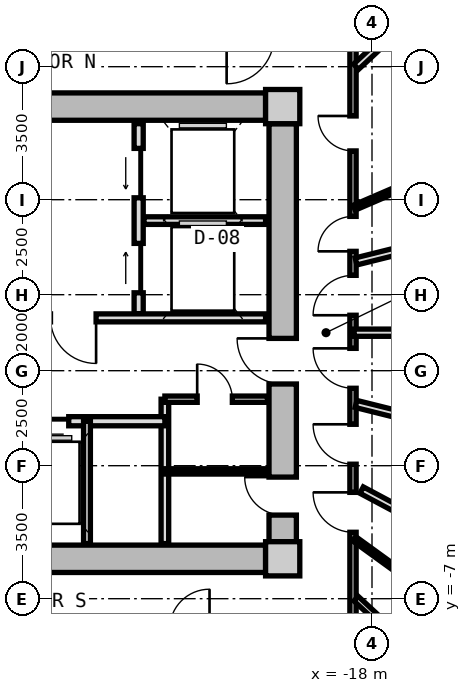
"""IFC4 building model, lengths in metres.
Left out: names, types, materials, properties, quantities, classifications, styles, units other than length and angle.
Written with IfcOpenShell. Run it as: python <this file> out.ifc"""

import sys

from ifc_helpers import new_model, si_unit, direction, frame, frame_2d, origin, origin_2d, place, context, subcontext, project, spatial, rectangle, extrude, source, transform, mapped, element, fill, save


model = new_model("IFC4")
c1 = context("Model", 3, precision=1e-05, world=origin(), true_north=direction((0.0, 1.0)))
c2 = subcontext(c1, "Body", "Model", "MODEL_VIEW")
j1 = project(units=[si_unit("LENGTHUNIT", "METRE"), si_unit("PLANEANGLEUNIT", "RADIAN")], contexts=[c1])
p1 = place(None, origin())
s1 = spatial("IfcSite", under=j1, at=p1, CompositionType="ELEMENT")
p2 = place(p1, origin())
s2 = spatial("IfcBuilding", under=s1, at=p2, CompositionType="ELEMENT")
p3 = place(p2, frame((0.0, 0.0, 114.55)))
s3 = spatial("IfcBuildingStorey", under=s2, at=p3, CompositionType="ELEMENT", Elevation=114.55)
m1 = source(origin(), c2, "Body", "SweptSolid", [
    extrude(rectangle(XDim=0.9, YDim=0.9, at=origin_2d()), origin(), (0.0, 0.0, 1.0), 3.05),
])
for number, where, z_axis, x_axis in (
    (1, (-20.35, -5.95, 0.0), (0.0, 0.0, 1.0), (1.0, 0.0, 0.0)),
    (2, (-20.35, 5.95, 0.0), (0.0, 0.0, 1.0), (1.0, 0.0, 0.0)),
):
    element("IfcColumn", number, at=place(p3, frame(where, z_axis=z_axis, x_axis=x_axis)), inside=s3, PredefinedType="COLUMN", context=c2, shape_type="MappedRepresentation", body=[
        mapped(m1, transform((0.0, 0.0, 0.0), x_axis=(1.0, 0.0, 0.0), y_axis=(0.0, 1.0, 0.0), z_axis=(0.0, 0.0, 1.0), scale=1.0)),
    ])
m2 = source(origin(), c2, "Body", "SweptSolid", [
    extrude(rectangle(XDim=14.4, YDim=0.72, at=frame_2d((7.2, 0.0))), origin(), (0.0, 0.0, 1.0), 2.79),
])
for number, where, z_axis, x_axis in (
    (3, (-35.2, 5.95, 0.0), (0.0, 0.0, 1.0), (1.0, 0.0, 0.0)),
    (4, (-20.8, -5.95, 0.0), (0.0, 0.0, 1.0), (-1.0, 0.0, 0.0)),
):
    element("IfcWall", number, at=place(p3, frame(where, z_axis=z_axis, x_axis=x_axis)), inside=s3, PredefinedType="SHEAR", context=c2, shape_type="MappedRepresentation", body=[
        mapped(m2, transform((0.0, 0.0, 0.0), x_axis=(1.0, 0.0, 0.0), y_axis=(0.0, 1.0, 0.0), z_axis=(0.0, 0.0, 1.0), scale=1.0)),
    ])
m3 = source(origin(), c2, "Body", "SweptSolid", [
    extrude(rectangle(XDim=11.0, YDim=0.72, at=frame_2d((5.5, 0.0))), origin(), (0.0, 0.0, 1.0), 2.79),
])
p4 = place(p3, frame((-20.35, 5.5, 0.0), z_axis=(0.0, 0.0, 1.0), x_axis=(0.0, -1.0, 0.0)))
e5 = element("IfcWall", 5, at=p4, inside=s3, PredefinedType="SHEAR", context=c2, shape_type="MappedRepresentation", body=[
    mapped(m3, transform((0.0, 0.0, 0.0), x_axis=(1.0, 0.0, 0.0), y_axis=(0.0, 1.0, 0.0), z_axis=(0.0, 0.0, 1.0), scale=1.0)),
])
p5 = place(p4, frame((5.65, 0.0, 0.0)))
e6 = element("IfcOpeningElement", 6, at=p5, cuts=e5, PredefinedType="OPENING", context=c2, shape_type="SweptSolid", body=[
    extrude(rectangle(XDim=1.2, YDim=2.15, at=frame_2d((0.6, 1.075))), frame((0.0, 0.37, 0.0), z_axis=(0.0, -1.0, 0.0), x_axis=(1.0, 0.0, 0.0)), (0.0, 0.0, 1.0), 0.74),
])
p6 = place(p4, frame((9.3, 0.0, 0.0)))
e7 = element("IfcOpeningElement", 7, at=p6, cuts=e5, PredefinedType="OPENING", context=c2, shape_type="SweptSolid", body=[
    extrude(rectangle(XDim=1.0, YDim=2.1, at=frame_2d((0.5, 1.05))), frame((0.0, 0.37, 0.0), z_axis=(0.0, -1.0, 0.0), x_axis=(1.0, 0.0, 0.0)), (0.0, 0.0, 1.0), 0.74),
])
m4 = source(origin(), c2, "Body", "SweptSolid", [
    extrude(rectangle(XDim=5.0, YDim=0.24, at=frame_2d((2.5, 0.0))), origin(), (0.0, 0.0, 1.0), 2.775),
])
p7 = place(p3, frame((-24.14, 0.5, 0.0), z_axis=(0.0, 0.0, 1.0), x_axis=(0.0, 1.0, 0.0)))
e8 = element("IfcWall", 8, at=p7, inside=s3, PredefinedType="PARTITIONING", context=c2, shape_type="MappedRepresentation", body=[
    mapped(m4, transform((0.0, 0.0, 0.0), x_axis=(1.0, 0.0, 0.0), y_axis=(0.0, 1.0, 0.0), z_axis=(0.0, 0.0, 1.0), scale=1.0)),
])
p8 = place(p7, frame((3.05, 0.0, 0.0)))
e9 = element("IfcOpeningElement", 9, at=p8, cuts=e8, PredefinedType="OPENING", context=c2, shape_type="SweptSolid", body=[
    extrude(rectangle(XDim=1.3, YDim=2.2, at=frame_2d((0.65, 1.1))), frame((0.0, 0.13, 0.0), z_axis=(0.0, -1.0, 0.0), x_axis=(1.0, 0.0, 0.0)), (0.0, 0.0, 1.0), 0.26),
])
p9 = place(p7, frame((0.55, 0.0, 0.0)))
e10 = element("IfcOpeningElement", 10, at=p9, cuts=e8, PredefinedType="OPENING", context=c2, shape_type="SweptSolid", body=[
    extrude(rectangle(XDim=1.3, YDim=2.2, at=frame_2d((0.65, 1.1))), frame((0.0, 0.13, 0.0), z_axis=(0.0, -1.0, 0.0), x_axis=(1.0, 0.0, 0.0)), (0.0, 0.0, 1.0), 0.26),
])
m5 = source(origin(), c2, "Body", "SweptSolid", [
    extrude(rectangle(XDim=3.2, YDim=0.2, at=frame_2d((1.6, 0.0))), origin(), (0.0, 0.0, 1.0), 2.775),
])
p10 = place(p3, frame((-24.0, 2.95, 0.0), z_axis=(0.0, 0.0, 1.0), x_axis=(1.0, 0.0, 0.0)))
e11 = element("IfcWall", 11, at=p10, inside=s3, PredefinedType="PARTITIONING", context=c2, shape_type="MappedRepresentation", body=[
    mapped(m5, transform((0.0, 0.0, 0.0), x_axis=(1.0, 0.0, 0.0), y_axis=(0.0, 1.0, 0.0), z_axis=(0.0, 0.0, 1.0), scale=1.0)),
])
m6 = source(origin(), c2, "Body", "SweptSolid", [
    extrude(rectangle(XDim=6.66, YDim=0.21, at=frame_2d((3.33, 0.0))), origin(), (0.0, 0.0, 1.0), 2.775),
])
p11 = place(p3, frame((-27.46, 0.39, 0.0), z_axis=(0.0, 0.0, 1.0), x_axis=(1.0, 0.0, 0.0)))
e12 = element("IfcWall", 12, at=p11, inside=s3, PredefinedType="PARTITIONING", context=c2, shape_type="MappedRepresentation", body=[
    mapped(m6, transform((0.0, 0.0, 0.0), x_axis=(1.0, 0.0, 0.0), y_axis=(0.0, 1.0, 0.0), z_axis=(0.0, 0.0, 1.0), scale=1.0)),
])
p12 = place(p11, frame((1.0, 0.0, 0.0)))
e13 = element("IfcOpeningElement", 13, at=p12, cuts=e12, PredefinedType="OPENING", context=c2, shape_type="SweptSolid", body=[
    extrude(rectangle(XDim=1.2, YDim=2.15, at=frame_2d((0.6, 1.075))), frame((0.0, 0.115, 0.0), z_axis=(0.0, -1.0, 0.0), x_axis=(1.0, 0.0, 0.0)), (0.0, 0.0, 1.0), 0.23),
])
m7 = source(origin(), c2, "Body", "SweptSolid", [
    extrude(rectangle(XDim=3.8, YDim=0.2, at=frame_2d((1.9, 0.0))), origin(), (0.0, 0.0, 1.0), 2.775),
])
p13 = place(p3, frame((-23.45, -5.55, 0.0), z_axis=(0.0, 0.0, 1.0), x_axis=(0.0, 1.0, 0.0)))
e14 = element("IfcWall", 14, at=p13, inside=s3, PredefinedType="PARTITIONING", context=c2, shape_type="MappedRepresentation", body=[
    mapped(m7, transform((0.0, 0.0, 0.0), x_axis=(1.0, 0.0, 0.0), y_axis=(0.0, 1.0, 0.0), z_axis=(0.0, 0.0, 1.0), scale=1.0)),
])
m8 = source(origin(), c2, "Body", "SweptSolid", [
    extrude(rectangle(XDim=4.13, YDim=0.24, at=frame_2d((2.065, 0.0))), origin(), (0.0, 0.0, 1.0), 2.775),
])
p14 = place(p3, frame((-27.58, -2.33, 0.0), z_axis=(0.0, 0.0, 1.0), x_axis=(1.0, 0.0, 0.0)))
e15 = element("IfcWall", 15, at=p14, inside=s3, PredefinedType="PARTITIONING", context=c2, shape_type="MappedRepresentation", body=[
    mapped(m8, transform((0.0, 0.0, 0.0), x_axis=(1.0, 0.0, 0.0), y_axis=(0.0, 1.0, 0.0), z_axis=(0.0, 0.0, 1.0), scale=1.0)),
])
p15 = place(p14, frame((0.5, 0.0, 0.0)))
e16 = element("IfcOpeningElement", 16, at=p15, cuts=e15, PredefinedType="OPENING", context=c2, shape_type="SweptSolid", body=[
    extrude(rectangle(XDim=1.1, YDim=2.2, at=frame_2d((0.55, 1.1))), frame((0.0, 0.13, 0.0), z_axis=(0.0, -1.0, 0.0), x_axis=(1.0, 0.0, 0.0)), (0.0, 0.0, 1.0), 0.26),
])
m9 = source(origin(), c2, "Body", "SweptSolid", [
    extrude(rectangle(XDim=3.22, YDim=0.18, at=frame_2d((1.61, 0.0))), origin(), (0.0, 0.0, 1.0), 2.775),
])
p16 = place(p3, frame((-25.5, -5.55, 0.0), z_axis=(0.0, 0.0, 1.0), x_axis=(0.0, 1.0, 0.0)))
e17 = element("IfcWall", 17, at=p16, inside=s3, PredefinedType="PARTITIONING", context=c2, shape_type="MappedRepresentation", body=[
    mapped(m9, transform((0.0, 0.0, 0.0), x_axis=(1.0, 0.0, 0.0), y_axis=(0.0, 1.0, 0.0), z_axis=(0.0, 0.0, 1.0), scale=1.0)),
])
m10 = source(origin(), c2, "Body", "SweptSolid", [
    extrude(rectangle(XDim=2.7, YDim=0.165, at=frame_2d((1.35, 0.0))), origin(), (0.0, 0.0, 1.0), 2.775),
])
p17 = place(p3, frame((-23.45, -1.75, 0.0), z_axis=(0.0, 0.0, 1.0), x_axis=(1.0, 0.0, 0.0)))
e18 = element("IfcWall", 18, at=p17, inside=s3, PredefinedType="PARTITIONING", context=c2, shape_type="MappedRepresentation", body=[
    mapped(m10, transform((0.0, 0.0, 0.0), x_axis=(1.0, 0.0, 0.0), y_axis=(0.0, 1.0, 0.0), z_axis=(0.0, 0.0, 1.0), scale=1.0)),
])
p18 = place(p17, frame((0.85, 0.0, 0.0)))
e19 = element("IfcOpeningElement", 19, at=p18, cuts=e18, PredefinedType="OPENING", context=c2, shape_type="SweptSolid", body=[
    extrude(rectangle(XDim=0.925, YDim=2.1, at=frame_2d((0.462, 1.05))), frame((0.0, 0.093, 0.0), z_axis=(0.0, -1.0, 0.0), x_axis=(1.0, 0.0, 0.0)), (0.0, 0.0, 1.0), 0.185),
])
m11 = source(origin(), c2, "Body", "SweptSolid", [
    extrude(rectangle(XDim=2.7, YDim=0.14, at=frame_2d((1.35, 0.0))), origin(), (0.0, 0.0, 1.0), 2.775),
])
p19 = place(p3, frame((-23.45, -3.65, 0.0), z_axis=(0.0, 0.0, 1.0), x_axis=(1.0, 0.0, 0.0)))
e20 = element("IfcWall", 20, at=p19, inside=s3, PredefinedType="PARTITIONING", context=c2, shape_type="MappedRepresentation", body=[
    mapped(m11, transform((0.0, 0.0, 0.0), x_axis=(1.0, 0.0, 0.0), y_axis=(0.0, 1.0, 0.0), z_axis=(0.0, 0.0, 1.0), scale=1.0)),
])
m12 = source(origin(), c2, "Body", "SweptSolid", [
    extrude(rectangle(XDim=15.6, YDim=0.165, at=frame_2d((7.8, 0.0))), origin(), (0.0, 0.0, 1.0), 2.775),
])
p20 = place(p3, frame((-18.5, 7.8, 0.0), z_axis=(0.0, 0.0, 1.0), x_axis=(0.0, -1.0, 0.0)))
e21 = element("IfcWall", 21, at=p20, inside=s3, PredefinedType="PARTITIONING", context=c2, shape_type="MappedRepresentation", body=[
    mapped(m12, transform((0.0, 0.0, 0.0), x_axis=(1.0, 0.0, 0.0), y_axis=(0.0, 1.0, 0.0), z_axis=(0.0, 0.0, 1.0), scale=1.0)),
])
p21 = place(p20, frame((12.002, 0.0, 0.0)))
e22 = element("IfcOpeningElement", 22, at=p21, cuts=e21, PredefinedType="OPENING", context=c2, shape_type="SweptSolid", body=[
    extrude(rectangle(XDim=1.05, YDim=2.15, at=frame_2d((0.525, 1.075))), frame((0.0, 0.093, 0.0), z_axis=(0.0, -1.0, 0.0), x_axis=(1.0, 0.0, 0.0)), (0.0, 0.0, 1.0), 0.185),
])
p22 = place(p20, frame((10.211, 0.0, 0.0)))
e23 = element("IfcOpeningElement", 23, at=p22, cuts=e21, PredefinedType="OPENING", context=c2, shape_type="SweptSolid", body=[
    extrude(rectangle(XDim=1.05, YDim=2.15, at=frame_2d((0.525, 1.075))), frame((0.0, 0.093, 0.0), z_axis=(0.0, -1.0, 0.0), x_axis=(1.0, 0.0, 0.0)), (0.0, 0.0, 1.0), 0.185),
])
p23 = place(p20, frame((8.212, 0.0, 0.0)))
e24 = element("IfcOpeningElement", 24, at=p23, cuts=e21, PredefinedType="OPENING", context=c2, shape_type="SweptSolid", body=[
    extrude(rectangle(XDim=1.05, YDim=2.15, at=frame_2d((0.525, 1.075))), frame((0.0, 0.093, 0.0), z_axis=(0.0, -1.0, 0.0), x_axis=(1.0, 0.0, 0.0)), (0.0, 0.0, 1.0), 0.185),
])
p24 = place(p20, frame((6.291, 0.0, 0.0)))
e25 = element("IfcOpeningElement", 25, at=p24, cuts=e21, PredefinedType="OPENING", context=c2, shape_type="SweptSolid", body=[
    extrude(rectangle(XDim=1.05, YDim=2.15, at=frame_2d((0.525, 1.075))), frame((0.0, 0.093, 0.0), z_axis=(0.0, -1.0, 0.0), x_axis=(1.0, 0.0, 0.0)), (0.0, 0.0, 1.0), 0.185),
])
p25 = place(p20, frame((4.739, 0.0, 0.0)))
e26 = element("IfcOpeningElement", 26, at=p25, cuts=e21, PredefinedType="OPENING", context=c2, shape_type="SweptSolid", body=[
    extrude(rectangle(XDim=0.92, YDim=2.1, at=frame_2d((0.46, 1.05))), frame((0.0, 0.093, 0.0), z_axis=(0.0, -1.0, 0.0), x_axis=(1.0, 0.0, 0.0)), (0.0, 0.0, 1.0), 0.185),
])
p26 = place(p20, frame((2.096, 0.0, 0.0)))
e27 = element("IfcOpeningElement", 27, at=p26, cuts=e21, PredefinedType="OPENING", context=c2, shape_type="SweptSolid", body=[
    extrude(rectangle(XDim=0.92, YDim=2.1, at=frame_2d((0.46, 1.05))), frame((0.0, 0.093, 0.0), z_axis=(0.0, -1.0, 0.0), x_axis=(1.0, 0.0, 0.0)), (0.0, 0.0, 1.0), 0.185),
])
m13 = source(origin(), c2, "Body", "SweptSolid", [
    extrude(rectangle(XDim=7.482, YDim=0.165, at=frame_2d((3.741, 0.0))), origin(), (0.0, 0.0, 1.0), 2.275),
])
p27 = place(p3, frame((-18.42, -6.998, 0.0), z_axis=(0.0, 0.0, 1.0), x_axis=(0.732508698043, -0.680757671489, 0.0)))
e28 = element("IfcWall", 28, at=p27, inside=s3, PredefinedType="PARTITIONING", context=c2, shape_type="MappedRepresentation", body=[
    mapped(m13, transform((0.0, 0.0, 0.0), x_axis=(1.0, 0.0, 0.0), y_axis=(0.0, 1.0, 0.0), z_axis=(0.0, 0.0, 1.0), scale=1.0)),
])
m14 = source(origin(), c2, "Body", "SweptSolid", [
    extrude(rectangle(XDim=10.556, YDim=0.19, at=frame_2d((5.278, 0.0))), origin(), (0.0, 0.0, 1.0), 2.275),
])
p28 = place(p3, frame((-18.42, -1.875, 0.0), z_axis=(0.0, 0.0, 1.0), x_axis=(0.970363857851, -0.241648470667, 0.0)))
e29 = element("IfcWall", 29, at=p28, inside=s3, PredefinedType="PARTITIONING", context=c2, shape_type="MappedRepresentation", body=[
    mapped(m14, transform((0.0, 0.0, 0.0), x_axis=(1.0, 0.0, 0.0), y_axis=(0.0, 1.0, 0.0), z_axis=(0.0, 0.0, 1.0), scale=1.0)),
])
m15 = source(origin(), c2, "Body", "SweptSolid", [
    extrude(rectangle(XDim=8.744, YDim=0.19, at=frame_2d((4.372, 0.0))), origin(), (0.0, 0.0, 1.0), 2.775),
])
p29 = place(p3, frame((-18.273, -4.142, 0.0), z_axis=(0.0, 0.0, 1.0), x_axis=(0.882252449936, -0.470776607938, 0.0)))
e30 = element("IfcWall", 30, at=p29, inside=s3, PredefinedType="PARTITIONING", context=c2, shape_type="MappedRepresentation", body=[
    mapped(m15, transform((0.0, 0.0, 0.0), x_axis=(1.0, 0.0, 0.0), y_axis=(0.0, 1.0, 0.0), z_axis=(0.0, 0.0, 1.0), scale=1.0)),
])
m16 = source(origin(), c2, "Body", "SweptSolid", [
    extrude(rectangle(XDim=3.621, YDim=0.14, at=frame_2d((1.811, 0.0))), origin(), (0.0, 0.0, 1.0), 2.775),
])
p30 = place(p3, frame((-18.47, -5.422, 0.0), z_axis=(0.0, 0.0, 1.0), x_axis=(0.80968252222, -0.586868139544, 0.0)))
e31 = element("IfcWall", 31, at=p30, inside=s3, PredefinedType="PARTITIONING", context=c2, shape_type="MappedRepresentation", body=[
    mapped(m16, transform((0.0, 0.0, 0.0), x_axis=(1.0, 0.0, 0.0), y_axis=(0.0, 1.0, 0.0), z_axis=(0.0, 0.0, 1.0), scale=1.0)),
])
p31 = place(p30, frame((1.351, 0.0, 0.0)))
e32 = element("IfcOpeningElement", 32, at=p31, cuts=e31, PredefinedType="OPENING", context=c2, shape_type="SweptSolid", body=[
    extrude(rectangle(XDim=0.92, YDim=2.1, at=frame_2d((0.46, 1.05))), frame((0.0, 0.08, 0.0), z_axis=(0.0, -1.0, 0.0), x_axis=(1.0, 0.0, 0.0)), (0.0, 0.0, 1.0), 0.16),
])
p32 = place(p3, frame((-18.42, 1.875, 0.0), z_axis=(0.0, 0.0, 1.0), x_axis=(0.970363857851, 0.241648470667, 0.0)))
e33 = element("IfcWall", 33, at=p32, inside=s3, PredefinedType="PARTITIONING", context=c2, shape_type="MappedRepresentation", body=[
    mapped(m14, transform((0.0, 0.0, 0.0), x_axis=(1.0, 0.0, 0.0), y_axis=(0.0, 1.0, 0.0), z_axis=(0.0, 0.0, 1.0), scale=1.0)),
])
m17 = source(origin(), c2, "Body", "SweptSolid", [
    extrude(rectangle(XDim=10.293, YDim=0.19, at=frame_2d((5.146, 0.0))), origin(), (0.0, 0.0, 1.0), 2.775),
])
p33 = place(p3, frame((-18.47, 0.0, 0.0), z_axis=(0.0, 0.0, 1.0), x_axis=(1.0, 0.0, 0.0)))
e34 = element("IfcWall", 34, at=p33, inside=s3, PredefinedType="PARTITIONING", context=c2, shape_type="MappedRepresentation", body=[
    mapped(m17, transform((0.0, 0.0, 0.0), x_axis=(1.0, 0.0, 0.0), y_axis=(0.0, 1.0, 0.0), z_axis=(0.0, 0.0, 1.0), scale=1.0)),
])
m18 = source(origin(), c2, "Body", "SweptSolid", [
    extrude(rectangle(XDim=7.482, YDim=0.19, at=frame_2d((3.741, 0.0))), origin(), (0.0, 0.0, 1.0), 2.275),
])
p34 = place(p3, frame((-18.42, 6.998, 0.0), z_axis=(0.0, 0.0, 1.0), x_axis=(0.732508698043, 0.680757671489, 0.0)))
e35 = element("IfcWall", 35, at=p34, inside=s3, PredefinedType="PARTITIONING", context=c2, shape_type="MappedRepresentation", body=[
    mapped(m18, transform((0.0, 0.0, 0.0), x_axis=(1.0, 0.0, 0.0), y_axis=(0.0, 1.0, 0.0), z_axis=(0.0, 0.0, 1.0), scale=1.0)),
])
m19 = source(origin(), c2, "Body", "SweptSolid", [
    extrude(rectangle(XDim=9.447, YDim=0.14, at=frame_2d((4.724, 0.0))), origin(), (0.0, 0.0, 1.0), 2.775),
])
p35 = place(p3, frame((-18.47, 3.289, 0.0), z_axis=(0.0, 0.0, 1.0), x_axis=(0.918162367414, 0.396204324894, 0.0)))
e36 = element("IfcWall", 36, at=p35, inside=s3, PredefinedType="PARTITIONING", context=c2, shape_type="MappedRepresentation", body=[
    mapped(m19, transform((0.0, 0.0, 0.0), x_axis=(1.0, 0.0, 0.0), y_axis=(0.0, 1.0, 0.0), z_axis=(0.0, 0.0, 1.0), scale=1.0)),
])
m20 = source(origin(), c2, "Body", "SweptSolid", [
    extrude(rectangle(XDim=1.3, YDim=2.2, at=frame_2d((0.65, 1.1))), frame((0.0, 0.025, 0.0), z_axis=(0.0, -1.0, 0.0), x_axis=(1.0, 0.0, 0.0)), (0.0, 0.0, 1.0), 0.05),
])
p36 = place(p8, origin())
e37 = element("IfcDoor", 37, at=p36, inside=s3, OperationType="SLIDING_TO_LEFT", PredefinedType="DOOR", context=c2, shape_type="MappedRepresentation", body=[
    mapped(m20, transform((0.0, 0.0, 0.0), x_axis=(1.0, 0.0, 0.0), y_axis=(0.0, 1.0, 0.0), z_axis=(0.0, 0.0, 1.0), scale=1.0)),
])
fill(e9, e37)
p37 = place(p9, origin())
e38 = element("IfcDoor", 38, at=p37, inside=s3, OperationType="SLIDING_TO_RIGHT", PredefinedType="DOOR", context=c2, shape_type="MappedRepresentation", body=[
    mapped(m20, transform((0.0, 0.0, 0.0), x_axis=(1.0, 0.0, 0.0), y_axis=(0.0, 1.0, 0.0), z_axis=(0.0, 0.0, 1.0), scale=1.0)),
])
fill(e10, e38)
m21 = source(origin(), c2, "Body", "SweptSolid", [
    extrude(rectangle(XDim=1.2, YDim=2.15, at=frame_2d((0.6, 1.075))), frame((0.0, 0.025, 0.0), z_axis=(0.0, -1.0, 0.0), x_axis=(1.0, 0.0, 0.0)), (0.0, 0.0, 1.0), 0.05),
])
p38 = place(p12, frame((1.2, 0.0, 0.0), z_axis=(0.0, 0.0, 1.0), x_axis=(-1.0, 0.0, 0.0)))
e39 = element("IfcDoor", 39, at=p38, inside=s3, OperationType="SINGLE_SWING_LEFT", PredefinedType="DOOR", context=c2, shape_type="MappedRepresentation", body=[
    mapped(m21, transform((0.0, 0.0, 0.0), x_axis=(1.0, 0.0, 0.0), y_axis=(0.0, 1.0, 0.0), z_axis=(0.0, 0.0, 1.0), scale=1.0)),
])
fill(e13, e39)
p39 = place(p5, frame((1.2, 0.0, 0.0), z_axis=(0.0, 0.0, 1.0), x_axis=(-1.0, 0.0, 0.0)))
e40 = element("IfcDoor", 40, at=p39, inside=s3, OperationType="SINGLE_SWING_RIGHT", PredefinedType="DOOR", context=c2, shape_type="MappedRepresentation", body=[
    mapped(m21, transform((0.0, 0.0, 0.0), x_axis=(1.0, 0.0, 0.0), y_axis=(0.0, 1.0, 0.0), z_axis=(0.0, 0.0, 1.0), scale=1.0)),
])
fill(e6, e40)
m22 = source(origin(), c2, "Body", "SweptSolid", [
    extrude(rectangle(XDim=1.1, YDim=2.2, at=frame_2d((0.55, 1.1))), frame((0.0, 0.025, 0.0), z_axis=(0.0, -1.0, 0.0), x_axis=(1.0, 0.0, 0.0)), (0.0, 0.0, 1.0), 0.05),
])
p40 = place(p15, frame((1.1, 0.0, 0.0), z_axis=(0.0, 0.0, 1.0), x_axis=(-1.0, 0.0, 0.0)))
e41 = element("IfcDoor", 41, at=p40, inside=s3, OperationType="SLIDING_TO_LEFT", PredefinedType="DOOR", context=c2, shape_type="MappedRepresentation", body=[
    mapped(m22, transform((0.0, 0.0, 0.0), x_axis=(1.0, 0.0, 0.0), y_axis=(0.0, 1.0, 0.0), z_axis=(0.0, 0.0, 1.0), scale=1.0)),
])
fill(e16, e41)
m23 = source(origin(), c2, "Body", "SweptSolid", [
    extrude(rectangle(XDim=0.925, YDim=2.1, at=frame_2d((0.462, 1.05))), frame((0.0, 0.025, 0.0), z_axis=(0.0, -1.0, 0.0), x_axis=(1.0, 0.0, 0.0)), (0.0, 0.0, 1.0), 0.05),
])
p41 = place(p18, origin())
e42 = element("IfcDoor", 42, at=p41, inside=s3, OperationType="SINGLE_SWING_LEFT", PredefinedType="DOOR", context=c2, shape_type="MappedRepresentation", body=[
    mapped(m23, transform((0.0, 0.0, 0.0), x_axis=(1.0, 0.0, 0.0), y_axis=(0.0, 1.0, 0.0), z_axis=(0.0, 0.0, 1.0), scale=1.0)),
])
fill(e19, e42)
m24 = source(origin(), c2, "Body", "SweptSolid", [
    extrude(rectangle(XDim=1.0, YDim=2.1, at=frame_2d((0.5, 1.05))), frame((0.0, 0.025, 0.0), z_axis=(0.0, -1.0, 0.0), x_axis=(1.0, 0.0, 0.0)), (0.0, 0.0, 1.0), 0.05),
])
p42 = place(p6, frame((1.0, 0.0, 0.0), z_axis=(0.0, 0.0, 1.0), x_axis=(-1.0, 0.0, 0.0)))
e43 = element("IfcDoor", 43, at=p42, inside=s3, OperationType="SINGLE_SWING_RIGHT", PredefinedType="DOOR", context=c2, shape_type="MappedRepresentation", body=[
    mapped(m24, transform((0.0, 0.0, 0.0), x_axis=(1.0, 0.0, 0.0), y_axis=(0.0, 1.0, 0.0), z_axis=(0.0, 0.0, 1.0), scale=1.0)),
])
fill(e7, e43)
m25 = source(origin(), c2, "Body", "SweptSolid", [
    extrude(rectangle(XDim=1.05, YDim=2.15, at=frame_2d((0.525, 1.075))), frame((0.0, 0.025, 0.0), z_axis=(0.0, -1.0, 0.0), x_axis=(1.0, 0.0, 0.0)), (0.0, 0.0, 1.0), 0.05),
])
p43 = place(p21, frame((1.05, 0.0, 0.0), z_axis=(0.0, 0.0, 1.0), x_axis=(-1.0, 0.0, 0.0)))
e44 = element("IfcDoor", 44, at=p43, inside=s3, OperationType="SINGLE_SWING_RIGHT", PredefinedType="DOOR", context=c2, shape_type="MappedRepresentation", body=[
    mapped(m25, transform((0.0, 0.0, 0.0), x_axis=(1.0, 0.0, 0.0), y_axis=(0.0, 1.0, 0.0), z_axis=(0.0, 0.0, 1.0), scale=1.0)),
])
fill(e22, e44)
p44 = place(p22, frame((1.05, 0.0, 0.0), z_axis=(0.0, 0.0, 1.0), x_axis=(-1.0, 0.0, 0.0)))
e45 = element("IfcDoor", 45, at=p44, inside=s3, OperationType="SINGLE_SWING_RIGHT", PredefinedType="DOOR", context=c2, shape_type="MappedRepresentation", body=[
    mapped(m25, transform((0.0, 0.0, 0.0), x_axis=(1.0, 0.0, 0.0), y_axis=(0.0, 1.0, 0.0), z_axis=(0.0, 0.0, 1.0), scale=1.0)),
])
fill(e23, e45)
p45 = place(p23, frame((1.05, 0.0, 0.0), z_axis=(0.0, 0.0, 1.0), x_axis=(-1.0, 0.0, 0.0)))
e46 = element("IfcDoor", 46, at=p45, inside=s3, OperationType="SINGLE_SWING_RIGHT", PredefinedType="DOOR", context=c2, shape_type="MappedRepresentation", body=[
    mapped(m25, transform((0.0, 0.0, 0.0), x_axis=(1.0, 0.0, 0.0), y_axis=(0.0, 1.0, 0.0), z_axis=(0.0, 0.0, 1.0), scale=1.0)),
])
fill(e24, e46)
p46 = place(p24, frame((1.05, 0.0, 0.0), z_axis=(0.0, 0.0, 1.0), x_axis=(-1.0, 0.0, 0.0)))
e47 = element("IfcDoor", 47, at=p46, inside=s3, OperationType="SINGLE_SWING_LEFT", PredefinedType="DOOR", context=c2, shape_type="MappedRepresentation", body=[
    mapped(m25, transform((0.0, 0.0, 0.0), x_axis=(1.0, 0.0, 0.0), y_axis=(0.0, 1.0, 0.0), z_axis=(0.0, 0.0, 1.0), scale=1.0)),
])
fill(e25, e47)
m26 = source(origin(), c2, "Body", "SweptSolid", [
    extrude(rectangle(XDim=0.92, YDim=2.1, at=frame_2d((0.46, 1.05))), frame((0.0, 0.025, 0.0), z_axis=(0.0, -1.0, 0.0), x_axis=(1.0, 0.0, 0.0)), (0.0, 0.0, 1.0), 0.05),
])
p47 = place(p25, frame((0.92, 0.0, 0.0), z_axis=(0.0, 0.0, 1.0), x_axis=(-1.0, 0.0, 0.0)))
e48 = element("IfcDoor", 48, at=p47, inside=s3, OperationType="SINGLE_SWING_LEFT", PredefinedType="DOOR", context=c2, shape_type="MappedRepresentation", body=[
    mapped(m26, transform((0.0, 0.0, 0.0), x_axis=(1.0, 0.0, 0.0), y_axis=(0.0, 1.0, 0.0), z_axis=(0.0, 0.0, 1.0), scale=1.0)),
])
fill(e26, e48)
p48 = place(p26, frame((0.92, 0.0, 0.0), z_axis=(0.0, 0.0, 1.0), x_axis=(-1.0, 0.0, 0.0)))
e49 = element("IfcDoor", 49, at=p48, inside=s3, OperationType="SINGLE_SWING_RIGHT", PredefinedType="DOOR", context=c2, shape_type="MappedRepresentation", body=[
    mapped(m26, transform((0.0, 0.0, 0.0), x_axis=(1.0, 0.0, 0.0), y_axis=(0.0, 1.0, 0.0), z_axis=(0.0, 0.0, 1.0), scale=1.0)),
])
fill(e27, e49)
save(model, sys.argv[1])
